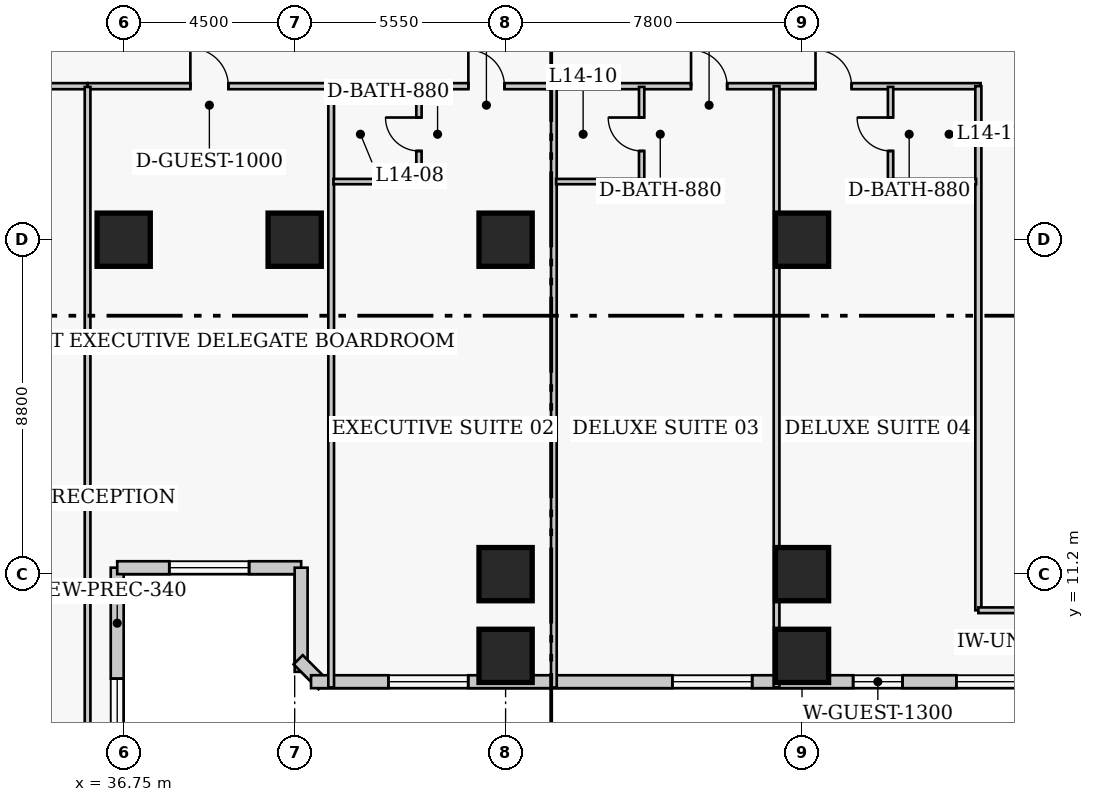
"""IFC4 building model, lengths in metres.
Left out: names, types, materials, properties, quantities, classifications, styles, units other than length and angle.
Written with IfcOpenShell. Run it as: python <this file> out.ifc"""

import sys

from ifc_helpers import new_model, si_unit, direction, frame, frame_2d, origin, origin_2d, place, context, subcontext, project, spatial, rectangle, extrude, element, fill, save


model = new_model("IFC4")
c1 = context("Model", 3, precision=1e-05, world=origin(), true_north=direction((0.0, 1.0)))
c2 = subcontext(c1, "Body", "Model", "MODEL_VIEW")
j1 = project(units=[si_unit("LENGTHUNIT", "METRE"), si_unit("PLANEANGLEUNIT", "RADIAN")], contexts=[c1])
p1 = place(None, origin())
s1 = spatial("IfcSite", under=j1, at=p1, CompositionType="ELEMENT")
p2 = place(p1, origin())
s2 = spatial("IfcBuilding", under=s1, at=p2, CompositionType="ELEMENT")
p3 = place(p2, frame((0.0, 0.0, 60.2)))
s3 = spatial("IfcBuildingStorey", under=s2, at=p3, CompositionType="ELEMENT", Elevation=60.2)
for number, where, z_axis, x_axis in (
    (1, (36.75, 20.0, 0.0), (0.0, 0.0, 1.0), (1.0, 0.0, 0.0)),
    (2, (41.25, 20.0, 0.0), (0.0, 0.0, 1.0), (1.0, 0.0, 0.0)),
    (3, (46.8, 11.2, 0.0), (0.0, 0.0, 1.0), (1.0, 0.0, 0.0)),
    (4, (46.8, 20.0, 0.0), (0.0, 0.0, 1.0), (1.0, 0.0, 0.0)),
    (5, (54.6, 11.2, 0.0), (0.0, 0.0, 1.0), (1.0, 0.0, 0.0)),
    (6, (54.6, 20.0, 0.0), (0.0, 0.0, 1.0), (1.0, 0.0, 0.0)),
    (7, (46.8, 9.05, 0.0), (0.0, 0.0, 1.0), (1.0, 0.0, 0.0)),
    (8, (54.6, 9.05, 0.0), (0.0, 0.0, 1.0), (1.0, 0.0, 0.0)),
):
    element("IfcColumn", number, at=place(p3, frame(where, z_axis=z_axis, x_axis=x_axis)), inside=s3, PredefinedType="COLUMN", context=c2, shape_type="SweptSolid", body=[
        extrude(rectangle(XDim=1.4, YDim=1.4, at=origin_2d()), origin(), (0.0, 0.0, 1.0), 3.8),
    ])
p4 = place(p3, frame((36.58, 3.43, 0.0), z_axis=(0.0, 0.0, 1.0), x_axis=(0.0, 1.0, 0.0)))
e9 = element("IfcWall", 9, at=p4, inside=s3, PredefinedType="SOLIDWALL", context=c2, shape_type="SweptSolid", body=[
    extrude(rectangle(XDim=7.94, YDim=0.34, at=frame_2d((3.97, 0.0))), origin(), (0.0, 0.0, 1.0), 3.54),
])
p5 = place(p4, frame((2.92, 0.0, 0.85)))
e10 = element("IfcOpeningElement", 10, at=p5, cuts=e9, PredefinedType="OPENING", context=c2, shape_type="SweptSolid", body=[
    extrude(rectangle(XDim=2.1, YDim=1.85, at=frame_2d((1.05, 0.925))), frame((0.0, 0.18, 0.0), z_axis=(0.0, -1.0, 0.0), x_axis=(1.0, 0.0, 0.0)), (0.0, 0.0, 1.0), 0.36),
])
p6 = place(p3, frame((36.58, 11.37, 0.0), z_axis=(0.0, 0.0, 1.0), x_axis=(1.0, 0.0, 0.0)))
e11 = element("IfcWall", 11, at=p6, inside=s3, PredefinedType="SOLIDWALL", context=c2, shape_type="SweptSolid", body=[
    extrude(rectangle(XDim=4.84, YDim=0.34, at=frame_2d((2.42, 0.0))), origin(), (0.0, 0.0, 1.0), 3.54),
])
p7 = place(p6, frame((1.37, 0.0, 0.85)))
e12 = element("IfcOpeningElement", 12, at=p7, cuts=e11, PredefinedType="OPENING", context=c2, shape_type="SweptSolid", body=[
    extrude(rectangle(XDim=2.1, YDim=1.85, at=frame_2d((1.05, 0.925))), frame((0.0, 0.18, 0.0), z_axis=(0.0, -1.0, 0.0), x_axis=(1.0, 0.0, 0.0)), (0.0, 0.0, 1.0), 0.36),
])
p8 = place(p3, frame((41.42, 11.37, 0.0), z_axis=(0.0, 0.0, 1.0), x_axis=(0.0, -1.0, 0.0)))
e13 = element("IfcWall", 13, at=p8, inside=s3, PredefinedType="SOLIDWALL", context=c2, shape_type="SweptSolid", body=[
    extrude(rectangle(XDim=2.74, YDim=0.34, at=frame_2d((1.37, 0.0))), origin(), (0.0, 0.0, 1.0), 3.54),
])
p9 = place(p3, frame((41.342, 8.948, 0.0), z_axis=(0.0, 0.0, 1.0), x_axis=(0.707238225886, -0.706975312048, 0.0)))
e14 = element("IfcWall", 14, at=p9, inside=s3, PredefinedType="SOLIDWALL", context=c2, shape_type="SweptSolid", body=[
    extrude(rectangle(XDim=0.929, YDim=0.34, at=frame_2d((0.464, 0.0))), origin(), (0.0, 0.0, 1.0), 3.54),
])
p10 = place(p3, frame((41.68, 8.37, 0.0), z_axis=(0.0, 0.0, 1.0), x_axis=(1.0, 0.0, 0.0)))
e15 = element("IfcWall", 15, at=p10, inside=s3, PredefinedType="SOLIDWALL", context=c2, shape_type="SweptSolid", body=[
    extrude(rectangle(XDim=29.89, YDim=0.34, at=frame_2d((14.945, 0.0))), origin(), (0.0, 0.0, 1.0), 3.54),
])
p11 = place(p10, frame((2.036, 0.0, 0.85)))
e16 = element("IfcOpeningElement", 16, at=p11, cuts=e15, PredefinedType="OPENING", context=c2, shape_type="SweptSolid", body=[
    extrude(rectangle(XDim=2.1, YDim=1.85, at=frame_2d((1.05, 0.925))), frame((0.0, 0.18, 0.0), z_axis=(0.0, -1.0, 0.0), x_axis=(1.0, 0.0, 0.0)), (0.0, 0.0, 1.0), 0.36),
])
p12 = place(p10, frame((9.509, 0.0, 0.85)))
e17 = element("IfcOpeningElement", 17, at=p12, cuts=e15, PredefinedType="OPENING", context=c2, shape_type="SweptSolid", body=[
    extrude(rectangle(XDim=2.1, YDim=1.85, at=frame_2d((1.05, 0.925))), frame((0.0, 0.18, 0.0), z_axis=(0.0, -1.0, 0.0), x_axis=(1.0, 0.0, 0.0)), (0.0, 0.0, 1.0), 0.36),
])
p13 = place(p10, frame((16.981, 0.0, 0.85)))
e18 = element("IfcOpeningElement", 18, at=p13, cuts=e15, PredefinedType="OPENING", context=c2, shape_type="SweptSolid", body=[
    extrude(rectangle(XDim=2.1, YDim=1.85, at=frame_2d((1.05, 0.925))), frame((0.0, 0.18, 0.0), z_axis=(0.0, -1.0, 0.0), x_axis=(1.0, 0.0, 0.0)), (0.0, 0.0, 1.0), 0.36),
])
p14 = place(p10, frame((26.254, 0.0, 0.85)))
e19 = element("IfcOpeningElement", 19, at=p14, cuts=e15, PredefinedType="OPENING", context=c2, shape_type="SweptSolid", body=[
    extrude(rectangle(XDim=2.1, YDim=1.85, at=frame_2d((1.05, 0.925))), frame((0.0, 0.18, 0.0), z_axis=(0.0, -1.0, 0.0), x_axis=(1.0, 0.0, 0.0)), (0.0, 0.0, 1.0), 0.36),
])
p15 = place(p10, frame((14.265, 0.0, 0.85)))
e20 = element("IfcOpeningElement", 20, at=p15, cuts=e15, PredefinedType="OPENING", context=c2, shape_type="SweptSolid", body=[
    extrude(rectangle(XDim=1.3, YDim=1.7, at=frame_2d((0.65, 0.85))), frame((0.0, 0.18, 0.0), z_axis=(0.0, -1.0, 0.0), x_axis=(1.0, 0.0, 0.0)), (0.0, 0.0, 1.0), 0.36),
])
p16 = place(p3, frame((20.4, 24.04, 0.0), z_axis=(0.0, 0.0, 1.0), x_axis=(1.0, 0.0, 0.0)))
e21 = element("IfcWall", 21, at=p16, inside=s3, PredefinedType="PARTITIONING", context=c2, shape_type="SweptSolid", body=[
    extrude(rectangle(XDim=15.4, YDim=0.16, at=frame_2d((7.7, 0.0))), origin(), (0.0, 0.0, 1.0), 3.54),
])
p17 = place(p16, frame((1.99, 0.0, 0.0)))
e22 = element("IfcOpeningElement", 22, at=p17, cuts=e21, PredefinedType="OPENING", context=c2, shape_type="SweptSolid", body=[
    extrude(rectangle(XDim=0.95, YDim=2.1, at=frame_2d((0.475, 1.05))), frame((0.0, 0.09, 0.0), z_axis=(0.0, -1.0, 0.0), x_axis=(1.0, 0.0, 0.0)), (0.0, 0.0, 1.0), 0.18),
])
p18 = place(p16, frame((10.79, 0.0, 0.0)))
e23 = element("IfcOpeningElement", 23, at=p18, cuts=e21, PredefinedType="OPENING", context=c2, shape_type="SweptSolid", body=[
    extrude(rectangle(XDim=1.0, YDim=2.15, at=frame_2d((0.5, 1.075))), frame((0.0, 0.09, 0.0), z_axis=(0.0, -1.0, 0.0), x_axis=(1.0, 0.0, 0.0)), (0.0, 0.0, 1.0), 0.18),
])
p19 = place(p3, frame((35.8, 24.04, 0.0), z_axis=(0.0, 0.0, 1.0), x_axis=(1.0, 0.0, 0.0)))
e24 = element("IfcWall", 24, at=p19, inside=s3, PredefinedType="PARTITIONING", context=c2, shape_type="SweptSolid", body=[
    extrude(rectangle(XDim=23.5, YDim=0.16, at=frame_2d((11.75, 0.0))), origin(), (0.0, 0.0, 1.0), 3.54),
])
p20 = place(p19, frame((2.705, 0.0, 0.0)))
e25 = element("IfcOpeningElement", 25, at=p20, cuts=e24, PredefinedType="OPENING", context=c2, shape_type="SweptSolid", body=[
    extrude(rectangle(XDim=1.0, YDim=2.15, at=frame_2d((0.5, 1.075))), frame((0.0, 0.09, 0.0), z_axis=(0.0, -1.0, 0.0), x_axis=(1.0, 0.0, 0.0)), (0.0, 0.0, 1.0), 0.18),
])
p21 = place(p19, frame((10.02, 0.0, 0.0)))
e26 = element("IfcOpeningElement", 26, at=p21, cuts=e24, PredefinedType="OPENING", context=c2, shape_type="SweptSolid", body=[
    extrude(rectangle(XDim=0.95, YDim=2.1, at=frame_2d((0.475, 1.05))), frame((0.0, 0.09, 0.0), z_axis=(0.0, -1.0, 0.0), x_axis=(1.0, 0.0, 0.0)), (0.0, 0.0, 1.0), 0.18),
])
p22 = place(p19, frame((15.88, 0.0, 0.0)))
e27 = element("IfcOpeningElement", 27, at=p22, cuts=e24, PredefinedType="OPENING", context=c2, shape_type="SweptSolid", body=[
    extrude(rectangle(XDim=0.95, YDim=2.1, at=frame_2d((0.475, 1.05))), frame((0.0, 0.09, 0.0), z_axis=(0.0, -1.0, 0.0), x_axis=(1.0, 0.0, 0.0)), (0.0, 0.0, 1.0), 0.18),
])
p23 = place(p19, frame((19.155, 0.0, 0.0)))
e28 = element("IfcOpeningElement", 28, at=p23, cuts=e24, PredefinedType="OPENING", context=c2, shape_type="SweptSolid", body=[
    extrude(rectangle(XDim=0.95, YDim=2.1, at=frame_2d((0.475, 1.05))), frame((0.0, 0.09, 0.0), z_axis=(0.0, -1.0, 0.0), x_axis=(1.0, 0.0, 0.0)), (0.0, 0.0, 1.0), 0.18),
])
p24 = place(p3, frame((59.24, 10.25, 0.0), z_axis=(0.0, 0.0, 1.0), x_axis=(0.0, 1.0, 0.0)))
e29 = element("IfcWall", 29, at=p24, inside=s3, PredefinedType="PARTITIONING", context=c2, shape_type="SweptSolid", body=[
    extrude(rectangle(XDim=13.79, YDim=0.16, at=frame_2d((6.895, 0.0))), origin(), (0.0, 0.0, 1.0), 3.54),
])
p25 = place(p3, frame((59.24, 10.25, 0.0), z_axis=(0.0, 0.0, 1.0), x_axis=(1.0, 0.0, 0.0)))
e30 = element("IfcWall", 30, at=p25, inside=s3, PredefinedType="PARTITIONING", context=c2, shape_type="SweptSolid", body=[
    extrude(rectangle(XDim=2.22, YDim=0.15, at=frame_2d((1.11, 0.0))), origin(), (0.0, 0.0, 1.0), 3.54),
])
p26 = place(p3, frame((35.8, 3.02, 0.0), z_axis=(0.0, 0.0, 1.0), x_axis=(0.0, 1.0, 0.0)))
e31 = element("IfcWall", 31, at=p26, inside=s3, PredefinedType="PARTITIONING", context=c2, shape_type="SweptSolid", body=[
    extrude(rectangle(XDim=21.0, YDim=0.15, at=frame_2d((10.5, 0.0))), origin(), (0.0, 0.0, 1.0), 3.54),
])
p27 = place(p3, frame((42.21, 8.22, 0.0), z_axis=(0.0, 0.0, 1.0), x_axis=(0.0, 1.0, 0.0)))
e32 = element("IfcWall", 32, at=p27, inside=s3, PredefinedType="PARTITIONING", context=c2, shape_type="SweptSolid", body=[
    extrude(rectangle(XDim=15.82, YDim=0.15, at=frame_2d((7.91, 0.0))), origin(), (0.0, 0.0, 1.0), 3.54),
])
p28 = place(p3, frame((44.52, 21.53, 0.0), z_axis=(0.0, 0.0, 1.0), x_axis=(0.0, 1.0, 0.0)))
e33 = element("IfcWall", 33, at=p28, inside=s3, PredefinedType="PLUMBINGWALL", context=c2, shape_type="SweptSolid", body=[
    extrude(rectangle(XDim=2.49, YDim=0.14, at=frame_2d((1.245, 0.0))), origin(), (0.0, 0.0, 1.0), 3.54),
])
p29 = place(p28, frame((0.805, 0.0, 0.0)))
e34 = element("IfcOpeningElement", 34, at=p29, cuts=e33, PredefinedType="OPENING", context=c2, shape_type="SweptSolid", body=[
    extrude(rectangle(XDim=0.88, YDim=2.05, at=frame_2d((0.44, 1.025))), frame((0.0, 0.08, 0.0), z_axis=(0.0, -1.0, 0.0), x_axis=(1.0, 0.0, 0.0)), (0.0, 0.0, 1.0), 0.16),
])
p30 = place(p3, frame((42.27, 21.53, 0.0), z_axis=(0.0, 0.0, 1.0), x_axis=(1.0, 0.0, 0.0)))
e35 = element("IfcWall", 35, at=p30, inside=s3, PredefinedType="PLUMBINGWALL", context=c2, shape_type="SweptSolid", body=[
    extrude(rectangle(XDim=2.25, YDim=0.14, at=frame_2d((1.125, 0.0))), origin(), (0.0, 0.0, 1.0), 3.54),
])
p31 = place(p3, frame((48.07, 8.22, 0.0), z_axis=(0.0, 0.0, 1.0), x_axis=(0.0, 1.0, 0.0)))
e36 = element("IfcWall", 36, at=p31, inside=s3, PredefinedType="PARTITIONING", context=c2, shape_type="SweptSolid", body=[
    extrude(rectangle(XDim=15.82, YDim=0.15, at=frame_2d((7.91, 0.0))), origin(), (0.0, 0.0, 1.0), 3.54),
])
p32 = place(p3, frame((50.38, 21.53, 0.0), z_axis=(0.0, 0.0, 1.0), x_axis=(0.0, 1.0, 0.0)))
e37 = element("IfcWall", 37, at=p32, inside=s3, PredefinedType="PLUMBINGWALL", context=c2, shape_type="SweptSolid", body=[
    extrude(rectangle(XDim=2.49, YDim=0.14, at=frame_2d((1.245, 0.0))), origin(), (0.0, 0.0, 1.0), 3.54),
])
p33 = place(p32, frame((0.805, 0.0, 0.0)))
e38 = element("IfcOpeningElement", 38, at=p33, cuts=e37, PredefinedType="OPENING", context=c2, shape_type="SweptSolid", body=[
    extrude(rectangle(XDim=0.88, YDim=2.05, at=frame_2d((0.44, 1.025))), frame((0.0, 0.08, 0.0), z_axis=(0.0, -1.0, 0.0), x_axis=(1.0, 0.0, 0.0)), (0.0, 0.0, 1.0), 0.16),
])
p34 = place(p3, frame((48.13, 21.53, 0.0), z_axis=(0.0, 0.0, 1.0), x_axis=(1.0, 0.0, 0.0)))
e39 = element("IfcWall", 39, at=p34, inside=s3, PredefinedType="PLUMBINGWALL", context=c2, shape_type="SweptSolid", body=[
    extrude(rectangle(XDim=2.25, YDim=0.14, at=frame_2d((1.125, 0.0))), origin(), (0.0, 0.0, 1.0), 3.54),
])
p35 = place(p3, frame((53.93, 8.22, 0.0), z_axis=(0.0, 0.0, 1.0), x_axis=(0.0, 1.0, 0.0)))
e40 = element("IfcWall", 40, at=p35, inside=s3, PredefinedType="PARTITIONING", context=c2, shape_type="SweptSolid", body=[
    extrude(rectangle(XDim=15.82, YDim=0.15, at=frame_2d((7.91, 0.0))), origin(), (0.0, 0.0, 1.0), 3.54),
])
p36 = place(p3, frame((56.93, 21.53, 0.0), z_axis=(0.0, 0.0, 1.0), x_axis=(0.0, 1.0, 0.0)))
e41 = element("IfcWall", 41, at=p36, inside=s3, PredefinedType="PLUMBINGWALL", context=c2, shape_type="SweptSolid", body=[
    extrude(rectangle(XDim=2.49, YDim=0.14, at=frame_2d((1.245, 0.0))), origin(), (0.0, 0.0, 1.0), 3.54),
])
p37 = place(p36, frame((0.805, 0.0, 0.0)))
e42 = element("IfcOpeningElement", 42, at=p37, cuts=e41, PredefinedType="OPENING", context=c2, shape_type="SweptSolid", body=[
    extrude(rectangle(XDim=0.88, YDim=2.05, at=frame_2d((0.44, 1.025))), frame((0.0, 0.08, 0.0), z_axis=(0.0, -1.0, 0.0), x_axis=(1.0, 0.0, 0.0)), (0.0, 0.0, 1.0), 0.16),
])
p38 = place(p3, frame((56.93, 21.53, 0.0), z_axis=(0.0, 0.0, 1.0), x_axis=(1.0, 0.0, 0.0)))
e43 = element("IfcWall", 43, at=p38, inside=s3, PredefinedType="PLUMBINGWALL", context=c2, shape_type="SweptSolid", body=[
    extrude(rectangle(XDim=2.25, YDim=0.14, at=frame_2d((1.125, 0.0))), origin(), (0.0, 0.0, 1.0), 3.54),
])
p39 = place(p5, origin())
e44 = element("IfcWindow", 44, at=p39, inside=s3, PartitioningType="SINGLE_PANEL", PredefinedType="WINDOW", context=c2, shape_type="SweptSolid", body=[
    extrude(rectangle(XDim=2.1, YDim=1.85, at=frame_2d((1.05, 0.925))), frame((0.0, 0.03, 0.0), z_axis=(0.0, -1.0, 0.0), x_axis=(1.0, 0.0, 0.0)), (0.0, 0.0, 1.0), 0.06),
])
fill(e10, e44)
p40 = place(p7, origin())
e45 = element("IfcWindow", 45, at=p40, inside=s3, PartitioningType="SINGLE_PANEL", PredefinedType="WINDOW", context=c2, shape_type="SweptSolid", body=[
    extrude(rectangle(XDim=2.1, YDim=1.85, at=frame_2d((1.05, 0.925))), frame((0.0, 0.03, 0.0), z_axis=(0.0, -1.0, 0.0), x_axis=(1.0, 0.0, 0.0)), (0.0, 0.0, 1.0), 0.06),
])
fill(e12, e45)
p41 = place(p11, origin())
e46 = element("IfcWindow", 46, at=p41, inside=s3, PartitioningType="SINGLE_PANEL", PredefinedType="WINDOW", context=c2, shape_type="SweptSolid", body=[
    extrude(rectangle(XDim=2.1, YDim=1.85, at=frame_2d((1.05, 0.925))), frame((0.0, 0.03, 0.0), z_axis=(0.0, -1.0, 0.0), x_axis=(1.0, 0.0, 0.0)), (0.0, 0.0, 1.0), 0.06),
])
fill(e16, e46)
p42 = place(p12, origin())
e47 = element("IfcWindow", 47, at=p42, inside=s3, PartitioningType="SINGLE_PANEL", PredefinedType="WINDOW", context=c2, shape_type="SweptSolid", body=[
    extrude(rectangle(XDim=2.1, YDim=1.85, at=frame_2d((1.05, 0.925))), frame((0.0, 0.03, 0.0), z_axis=(0.0, -1.0, 0.0), x_axis=(1.0, 0.0, 0.0)), (0.0, 0.0, 1.0), 0.06),
])
fill(e17, e47)
p43 = place(p13, origin())
e48 = element("IfcWindow", 48, at=p43, inside=s3, PartitioningType="SINGLE_PANEL", PredefinedType="WINDOW", context=c2, shape_type="SweptSolid", body=[
    extrude(rectangle(XDim=2.1, YDim=1.85, at=frame_2d((1.05, 0.925))), frame((0.0, 0.03, 0.0), z_axis=(0.0, -1.0, 0.0), x_axis=(1.0, 0.0, 0.0)), (0.0, 0.0, 1.0), 0.06),
])
fill(e18, e48)
p44 = place(p15, origin())
e49 = element("IfcWindow", 49, at=p44, inside=s3, PartitioningType="SINGLE_PANEL", PredefinedType="WINDOW", context=c2, shape_type="SweptSolid", body=[
    extrude(rectangle(XDim=1.3, YDim=1.7, at=frame_2d((0.65, 0.85))), frame((0.0, 0.03, 0.0), z_axis=(0.0, -1.0, 0.0), x_axis=(1.0, 0.0, 0.0)), (0.0, 0.0, 1.0), 0.06),
])
fill(e20, e49)
p45 = place(p20, origin())
e50 = element("IfcDoor", 50, at=p45, inside=s3, OperationType="SINGLE_SWING_LEFT", PredefinedType="DOOR", context=c2, shape_type="SweptSolid", body=[
    extrude(rectangle(XDim=1.0, YDim=2.15, at=frame_2d((0.5, 1.075))), frame((0.0, 0.025, 0.0), z_axis=(0.0, -1.0, 0.0), x_axis=(1.0, 0.0, 0.0)), (0.0, 0.0, 1.0), 0.05),
])
fill(e25, e50)
p46 = place(p29, origin())
e51 = element("IfcDoor", 51, at=p46, inside=s3, OperationType="SINGLE_SWING_RIGHT", PredefinedType="DOOR", context=c2, shape_type="SweptSolid", body=[
    extrude(rectangle(XDim=0.88, YDim=2.05, at=frame_2d((0.44, 1.025))), frame((0.0, 0.025, 0.0), z_axis=(0.0, -1.0, 0.0), x_axis=(1.0, 0.0, 0.0)), (0.0, 0.0, 1.0), 0.05),
])
fill(e34, e51)
p47 = place(p21, origin())
e52 = element("IfcDoor", 52, at=p47, inside=s3, OperationType="SINGLE_SWING_LEFT", PredefinedType="DOOR", context=c2, shape_type="SweptSolid", body=[
    extrude(rectangle(XDim=0.95, YDim=2.1, at=frame_2d((0.475, 1.05))), frame((0.0, 0.025, 0.0), z_axis=(0.0, -1.0, 0.0), x_axis=(1.0, 0.0, 0.0)), (0.0, 0.0, 1.0), 0.05),
])
fill(e26, e52)
p48 = place(p33, origin())
e53 = element("IfcDoor", 53, at=p48, inside=s3, OperationType="SINGLE_SWING_RIGHT", PredefinedType="DOOR", context=c2, shape_type="SweptSolid", body=[
    extrude(rectangle(XDim=0.88, YDim=2.05, at=frame_2d((0.44, 1.025))), frame((0.0, 0.025, 0.0), z_axis=(0.0, -1.0, 0.0), x_axis=(1.0, 0.0, 0.0)), (0.0, 0.0, 1.0), 0.05),
])
fill(e38, e53)
p49 = place(p22, origin())
e54 = element("IfcDoor", 54, at=p49, inside=s3, OperationType="SINGLE_SWING_LEFT", PredefinedType="DOOR", context=c2, shape_type="SweptSolid", body=[
    extrude(rectangle(XDim=0.95, YDim=2.1, at=frame_2d((0.475, 1.05))), frame((0.0, 0.025, 0.0), z_axis=(0.0, -1.0, 0.0), x_axis=(1.0, 0.0, 0.0)), (0.0, 0.0, 1.0), 0.05),
])
fill(e27, e54)
p50 = place(p37, origin())
e55 = element("IfcDoor", 55, at=p50, inside=s3, OperationType="SINGLE_SWING_RIGHT", PredefinedType="DOOR", context=c2, shape_type="SweptSolid", body=[
    extrude(rectangle(XDim=0.88, YDim=2.05, at=frame_2d((0.44, 1.025))), frame((0.0, 0.025, 0.0), z_axis=(0.0, -1.0, 0.0), x_axis=(1.0, 0.0, 0.0)), (0.0, 0.0, 1.0), 0.05),
])
fill(e42, e55)
p51 = place(p23, origin())
e56 = element("IfcDoor", 56, at=p51, inside=s3, OperationType="SINGLE_SWING_LEFT", PredefinedType="DOOR", context=c2, shape_type="SweptSolid", body=[
    extrude(rectangle(XDim=0.95, YDim=2.1, at=frame_2d((0.475, 1.05))), frame((0.0, 0.025, 0.0), z_axis=(0.0, -1.0, 0.0), x_axis=(1.0, 0.0, 0.0)), (0.0, 0.0, 1.0), 0.05),
])
fill(e28, e56)
save(model, sys.argv[1])
